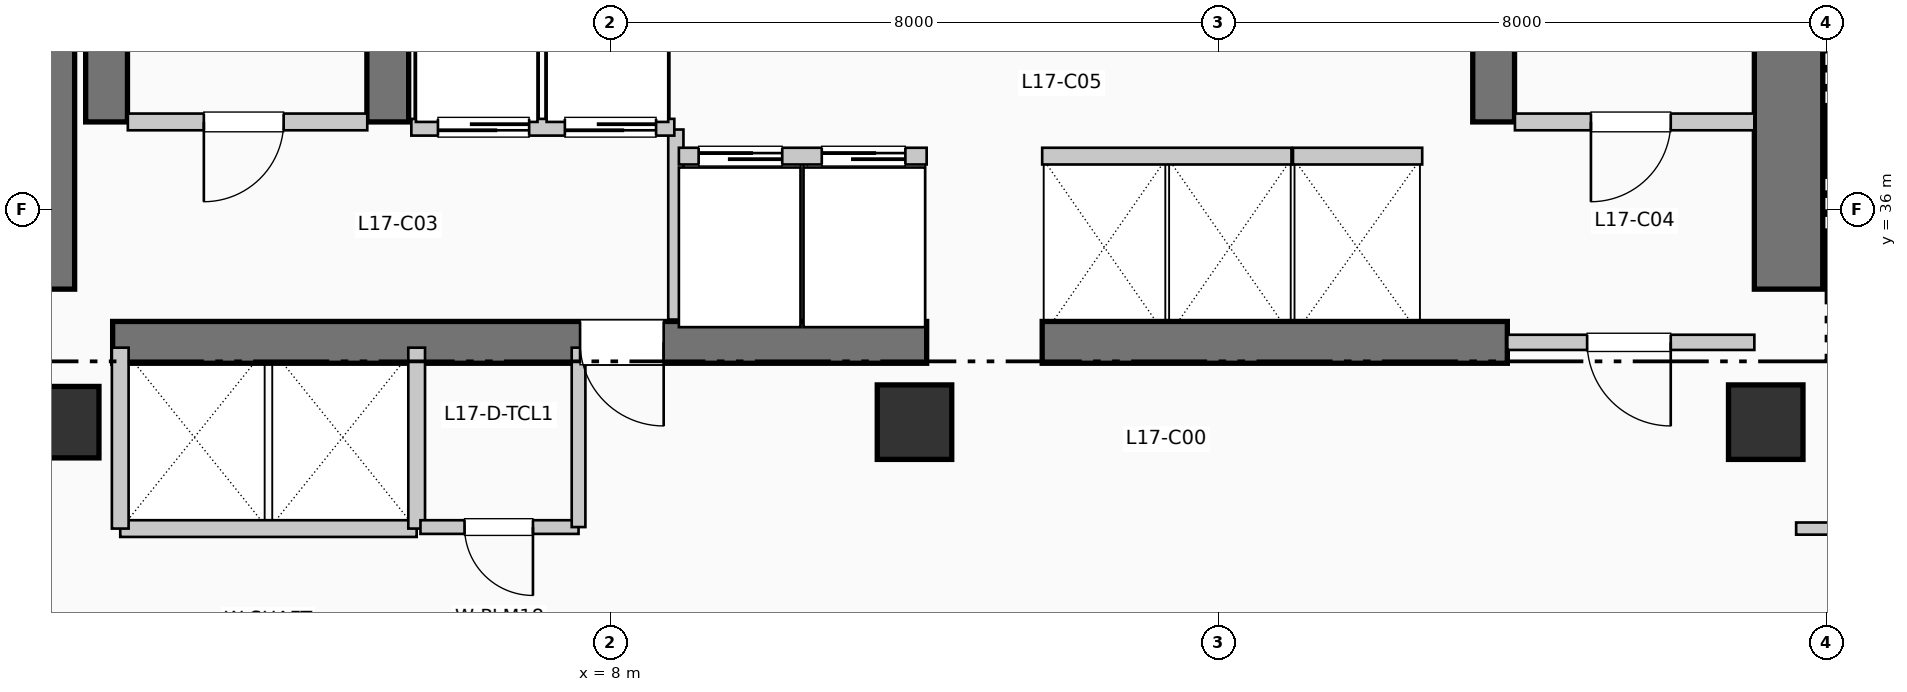
"""IFC4 building model, lengths in metres.
Left out: names, types, materials, properties, quantities, classifications, styles, units other than length and angle.
Written with IfcOpenShell. Run it as: python <this file> out.ifc"""

import sys

from ifc_helpers import new_model, si_unit, direction, frame, frame_2d, origin, origin_2d, place, context, subcontext, project, spatial, rectangle, extrude, element, fill, save


model = new_model("IFC4")
c1 = context("Model", 3, precision=1e-05, world=origin(), true_north=direction((0.0, 1.0)))
c2 = subcontext(c1, "Body", "Model", "MODEL_VIEW")
j1 = project(units=[si_unit("LENGTHUNIT", "METRE"), si_unit("PLANEANGLEUNIT", "RADIAN")], contexts=[c1])
p1 = place(None, origin())
s1 = spatial("IfcSite", under=j1, at=p1, CompositionType="ELEMENT")
p2 = place(p1, origin())
s2 = spatial("IfcBuilding", under=s1, at=p2, CompositionType="ELEMENT")
p3 = place(p2, frame((0.0, 0.0, 73.92)))
s3 = spatial("IfcBuildingStorey", under=s2, at=p3, CompositionType="ELEMENT", Elevation=73.92)
p4 = place(p3, frame((0.5, 34.95, 0.0), z_axis=(0.0, 0.0, 1.0), x_axis=(0.0, 1.0, 0.0)))
e1 = element("IfcWall", 1, at=p4, inside=s3, PredefinedType="SHEAR", context=c2, shape_type="SweptSolid", body=[
    extrude(rectangle(XDim=7.9, YDim=0.9, at=frame_2d((3.95, 0.0))), origin(), (0.0, 0.0, 1.0), 3.96),
])
p5 = place(p3, frame((23.5, 34.95, 0.0), z_axis=(0.0, 0.0, 1.0), x_axis=(0.0, 1.0, 0.0)))
e2 = element("IfcWall", 2, at=p5, inside=s3, PredefinedType="SHEAR", context=c2, shape_type="SweptSolid", body=[
    extrude(rectangle(XDim=10.64, YDim=0.9, at=frame_2d((5.32, 0.0))), origin(), (0.0, 0.0, 1.0), 3.96),
])
p6 = place(p3, frame((1.45, 34.25, 0.0), z_axis=(0.0, 0.0, 1.0), x_axis=(1.0, 0.0, 0.0)))
e3 = element("IfcWall", 3, at=p6, inside=s3, PredefinedType="SHEAR", context=c2, shape_type="SweptSolid", body=[
    extrude(rectangle(XDim=10.71, YDim=0.55, at=frame_2d((5.355, 0.0))), origin(), (0.0, 0.0, 1.0), 3.96),
])
p7 = place(p6, frame((7.25, 0.0, 0.0), z_axis=(0.0, 0.0, 1.0), x_axis=(-1.0, 0.0, 0.0)))
e4 = element("IfcOpeningElement", 4, at=p7, cuts=e3, PredefinedType="OPENING", context=c2, shape_type="SweptSolid", body=[
    extrude(rectangle(XDim=1.1, YDim=2.15, at=frame_2d((0.55, 1.075))), frame((0.0, 0.285, 0.0), z_axis=(0.0, -1.0, 0.0), x_axis=(1.0, 0.0, 0.0)), (0.0, 0.0, 1.0), 0.57),
])
p8 = place(p3, frame((13.68, 34.25, 0.0), z_axis=(0.0, 0.0, 1.0), x_axis=(1.0, 0.0, 0.0)))
e5 = element("IfcWall", 5, at=p8, inside=s3, PredefinedType="SHEAR", context=c2, shape_type="SweptSolid", body=[
    extrude(rectangle(XDim=6.12, YDim=0.55, at=frame_2d((3.06, 0.0))), origin(), (0.0, 0.0, 1.0), 3.96),
])
for number, where, z_axis, x_axis in (
    (6, (1.37, 37.15, 0.0), (0.0, 0.0, 1.0), (0.0, 1.0, 0.0)),
    (7, (5.07, 37.15, 0.0), (0.0, 0.0, 1.0), (0.0, 1.0, 0.0)),
    (8, (19.62, 37.15, 0.0), (0.0, 0.0, 1.0), (0.0, 1.0, 0.0)),
):
    element("IfcWall", number, at=place(p3, frame(where, z_axis=z_axis, x_axis=x_axis)), inside=s3, PredefinedType="SHEAR", context=c2, shape_type="SweptSolid", body=[
        extrude(rectangle(XDim=7.89, YDim=0.55, at=frame_2d((3.945, 0.0))), origin(), (0.0, 0.0, 1.0), 3.96),
    ])
p9 = place(p3, frame((0.8, 33.2, 0.0), z_axis=(0.0, 0.0, 1.0), x_axis=(1.0, 0.0, 0.0)))
e9 = element("IfcColumn", 9, at=p9, inside=s3, PredefinedType="COLUMN", context=c2, shape_type="SweptSolid", body=[
    extrude(rectangle(XDim=0.94, YDim=0.94, at=origin_2d()), origin(), (0.0, 0.0, 1.0), 3.96),
])
for number, where, z_axis, x_axis in (
    (10, (12.0, 33.2, 0.0), (0.0, 0.0, 1.0), (1.0, 0.0, 0.0)),
    (11, (23.2, 33.2, 0.0), (0.0, 0.0, 1.0), (1.0, 0.0, 0.0)),
):
    element("IfcColumn", number, at=place(p3, frame(where, z_axis=z_axis, x_axis=x_axis)), inside=s3, PredefinedType="COLUMN", context=c2, shape_type="SweptSolid", body=[
        extrude(rectangle(XDim=0.98, YDim=0.98, at=origin_2d()), origin(), (0.0, 0.0, 1.0), 3.96),
    ])
p10 = place(p3, frame((1.65, 37.15, 0.0), z_axis=(0.0, 0.0, 1.0), x_axis=(1.0, 0.0, 0.0)))
e12 = element("IfcWall", 12, at=p10, inside=s3, PredefinedType="PARTITIONING", context=c2, shape_type="SweptSolid", body=[
    extrude(rectangle(XDim=3.15, YDim=0.22, at=frame_2d((1.575, 0.0))), origin(), (0.0, 0.0, 1.0), 3.71),
])
p11 = place(p10, frame((2.05, 0.0, 0.0), z_axis=(0.0, 0.0, 1.0), x_axis=(-1.0, 0.0, 0.0)))
e13 = element("IfcOpeningElement", 13, at=p11, cuts=e12, PredefinedType="OPENING", context=c2, shape_type="SweptSolid", body=[
    extrude(rectangle(XDim=1.05, YDim=2.15, at=frame_2d((0.525, 1.075))), frame((0.0, 0.12, 0.0), z_axis=(0.0, -1.0, 0.0), x_axis=(1.0, 0.0, 0.0)), (0.0, 0.0, 1.0), 0.24),
])
p12 = place(p3, frame((8.86, 34.55, 0.0), z_axis=(0.0, 0.0, 1.0), x_axis=(0.0, 1.0, 0.0)))
e14 = element("IfcWall", 14, at=p12, inside=s3, PredefinedType="PARTITIONING", context=c2, shape_type="SweptSolid", body=[
    extrude(rectangle(XDim=2.5, YDim=0.2, at=frame_2d((1.25, 0.0))), origin(), (0.0, 0.0, 1.0), 3.71),
])
p13 = place(p3, frame((19.9, 37.15, 0.0), z_axis=(0.0, 0.0, 1.0), x_axis=(1.0, 0.0, 0.0)))
e15 = element("IfcWall", 15, at=p13, inside=s3, PredefinedType="PARTITIONING", context=c2, shape_type="SweptSolid", body=[
    extrude(rectangle(XDim=3.15, YDim=0.22, at=frame_2d((1.575, 0.0))), origin(), (0.0, 0.0, 1.0), 3.71),
])
p14 = place(p13, frame((2.05, 0.0, 0.0), z_axis=(0.0, 0.0, 1.0), x_axis=(-1.0, 0.0, 0.0)))
e16 = element("IfcOpeningElement", 16, at=p14, cuts=e15, PredefinedType="OPENING", context=c2, shape_type="SweptSolid", body=[
    extrude(rectangle(XDim=1.05, YDim=2.15, at=frame_2d((0.525, 1.075))), frame((0.0, 0.12, 0.0), z_axis=(0.0, -1.0, 0.0), x_axis=(1.0, 0.0, 0.0)), (0.0, 0.0, 1.0), 0.24),
])
p15 = place(p3, frame((19.8, 34.25, 0.0), z_axis=(0.0, 0.0, 1.0), x_axis=(1.0, 0.0, 0.0)))
e17 = element("IfcWall", 17, at=p15, inside=s3, PredefinedType="PARTITIONING", context=c2, shape_type="SweptSolid", body=[
    extrude(rectangle(XDim=3.25, YDim=0.2, at=frame_2d((1.625, 0.0))), origin(), (0.0, 0.0, 1.0), 3.71),
])
p16 = place(p15, frame((2.15, 0.0, 0.0), z_axis=(0.0, 0.0, 1.0), x_axis=(-1.0, 0.0, 0.0)))
e18 = element("IfcOpeningElement", 18, at=p16, cuts=e17, PredefinedType="OPENING", context=c2, shape_type="SweptSolid", body=[
    extrude(rectangle(XDim=1.1, YDim=2.15, at=frame_2d((0.55, 1.075))), frame((0.0, 0.11, 0.0), z_axis=(0.0, -1.0, 0.0), x_axis=(1.0, 0.0, 0.0)), (0.0, 0.0, 1.0), 0.22),
])
p17 = place(p3, frame((5.38, 37.08, 0.0), z_axis=(0.0, 0.0, 1.0), x_axis=(1.0, 0.0, 0.0)))
e19 = element("IfcWall", 19, at=p17, inside=s3, PredefinedType="PARTITIONING", context=c2, shape_type="SweptSolid", body=[
    extrude(rectangle(XDim=3.46, YDim=0.22, at=frame_2d((1.73, 0.0))), origin(), (0.0, 0.0, 1.0), 3.71),
])
p18 = place(p17, frame((1.55, 0.0, 0.0), z_axis=(0.0, 0.0, 1.0), x_axis=(-1.0, 0.0, 0.0)))
e20 = element("IfcOpeningElement", 20, at=p18, cuts=e19, PredefinedType="OPENING", context=c2, shape_type="SweptSolid", body=[
    extrude(rectangle(XDim=1.2, YDim=2.2, at=frame_2d((0.6, 1.1))), frame((0.0, 0.12, 0.0), z_axis=(0.0, -1.0, 0.0), x_axis=(1.0, 0.0, 0.0)), (0.0, 0.0, 1.0), 0.24),
])
p19 = place(p17, frame((3.22, 0.0, 0.0), z_axis=(0.0, 0.0, 1.0), x_axis=(-1.0, 0.0, 0.0)))
e21 = element("IfcOpeningElement", 21, at=p19, cuts=e19, PredefinedType="OPENING", context=c2, shape_type="SweptSolid", body=[
    extrude(rectangle(XDim=1.2, YDim=2.2, at=frame_2d((0.6, 1.1))), frame((0.0, 0.12, 0.0), z_axis=(0.0, -1.0, 0.0), x_axis=(1.0, 0.0, 0.0)), (0.0, 0.0, 1.0), 0.24),
])
p20 = place(p3, frame((1.55, 31.8, 0.0), z_axis=(0.0, 0.0, 1.0), x_axis=(1.0, 0.0, 0.0)))
e22 = element("IfcWall", 22, at=p20, inside=s3, PredefinedType="PARTITIONING", context=c2, shape_type="SweptSolid", body=[
    extrude(rectangle(XDim=3.9, YDim=0.22, at=frame_2d((1.95, 0.0))), origin(), (0.0, 0.0, 1.0), 3.71),
])
for number, where, z_axis, x_axis in (
    (23, (1.55, 31.8, 0.0), (0.0, 0.0, 1.0), (0.0, 1.0, 0.0)),
    (24, (5.45, 31.8, 0.0), (0.0, 0.0, 1.0), (0.0, 1.0, 0.0)),
):
    element("IfcWall", number, at=place(p3, frame(where, z_axis=z_axis, x_axis=x_axis)), inside=s3, PredefinedType="PARTITIONING", context=c2, shape_type="SweptSolid", body=[
        extrude(rectangle(XDim=2.38, YDim=0.22, at=frame_2d((1.19, 0.0))), origin(), (0.0, 0.0, 1.0), 3.71),
    ])
p21 = place(p3, frame((5.5, 31.82, 0.0), z_axis=(0.0, 0.0, 1.0), x_axis=(1.0, 0.0, 0.0)))
e25 = element("IfcWall", 25, at=p21, inside=s3, PredefinedType="PLUMBINGWALL", context=c2, shape_type="SweptSolid", body=[
    extrude(rectangle(XDim=2.08, YDim=0.18, at=frame_2d((1.04, 0.0))), origin(), (0.0, 0.0, 1.0), 3.71),
])
p22 = place(p21, frame((1.48, 0.0, 0.0), z_axis=(0.0, 0.0, 1.0), x_axis=(-1.0, 0.0, 0.0)))
e26 = element("IfcOpeningElement", 26, at=p22, cuts=e25, PredefinedType="OPENING", context=c2, shape_type="SweptSolid", body=[
    extrude(rectangle(XDim=0.9, YDim=2.1, at=frame_2d((0.45, 1.05))), frame((0.0, 0.1, 0.0), z_axis=(0.0, -1.0, 0.0), x_axis=(1.0, 0.0, 0.0)), (0.0, 0.0, 1.0), 0.2),
])
p23 = place(p3, frame((7.58, 31.82, 0.0), z_axis=(0.0, 0.0, 1.0), x_axis=(0.0, 1.0, 0.0)))
e27 = element("IfcWall", 27, at=p23, inside=s3, PredefinedType="PLUMBINGWALL", context=c2, shape_type="SweptSolid", body=[
    extrude(rectangle(XDim=2.36, YDim=0.18, at=frame_2d((1.18, 0.0))), origin(), (0.0, 0.0, 1.0), 3.71),
])
p24 = place(p3, frame((8.9, 36.7, 0.0), z_axis=(0.0, 0.0, 1.0), x_axis=(1.0, 0.0, 0.0)))
e28 = element("IfcWall", 28, at=p24, inside=s3, PredefinedType="PARTITIONING", context=c2, shape_type="SweptSolid", body=[
    extrude(rectangle(XDim=3.26, YDim=0.22, at=frame_2d((1.63, 0.0))), origin(), (0.0, 0.0, 1.0), 3.71),
])
p25 = place(p24, frame((0.26, 0.0, 0.0)))
e29 = element("IfcOpeningElement", 29, at=p25, cuts=e28, PredefinedType="OPENING", context=c2, shape_type="SweptSolid", body=[
    extrude(rectangle(XDim=1.1, YDim=2.2, at=frame_2d((0.55, 1.1))), frame((0.0, 0.12, 0.0), z_axis=(0.0, -1.0, 0.0), x_axis=(1.0, 0.0, 0.0)), (0.0, 0.0, 1.0), 0.24),
])
p26 = place(p24, frame((1.88, 0.0, 0.0)))
e30 = element("IfcOpeningElement", 30, at=p26, cuts=e28, PredefinedType="OPENING", context=c2, shape_type="SweptSolid", body=[
    extrude(rectangle(XDim=1.1, YDim=2.2, at=frame_2d((0.55, 1.1))), frame((0.0, 0.12, 0.0), z_axis=(0.0, -1.0, 0.0), x_axis=(1.0, 0.0, 0.0)), (0.0, 0.0, 1.0), 0.24),
])
p27 = place(p3, frame((13.68, 36.7, 0.0), z_axis=(0.0, 0.0, 1.0), x_axis=(1.0, 0.0, 0.0)))
e31 = element("IfcWall", 31, at=p27, inside=s3, PredefinedType="PARTITIONING", context=c2, shape_type="SweptSolid", body=[
    extrude(rectangle(XDim=3.28, YDim=0.22, at=frame_2d((1.64, 0.0))), origin(), (0.0, 0.0, 1.0), 3.71),
])
p28 = place(p3, frame((16.98, 36.7, 0.0), z_axis=(0.0, 0.0, 1.0), x_axis=(1.0, 0.0, 0.0)))
e32 = element("IfcWall", 32, at=p28, inside=s3, PredefinedType="PARTITIONING", context=c2, shape_type="SweptSolid", body=[
    extrude(rectangle(XDim=1.7, YDim=0.22, at=frame_2d((0.85, 0.0))), origin(), (0.0, 0.0, 1.0), 3.71),
])
p29 = place(p3, frame((23.6, 31.8, 0.0), z_axis=(0.0, 0.0, 1.0), x_axis=(1.0, 0.0, 0.0)))
e33 = element("IfcWall", 33, at=p29, inside=s3, PredefinedType="PARTITIONING", context=c2, shape_type="SweptSolid", body=[
    extrude(rectangle(XDim=32.21, YDim=0.16, at=frame_2d((16.105, 0.0))), origin(), (0.0, 0.0, 1.0), 3.71),
])
p30 = place(p29, frame((2.585, 0.0, 0.0)))
e34 = element("IfcOpeningElement", 34, at=p30, cuts=e33, PredefinedType="OPENING", context=c2, shape_type="SweptSolid", body=[
    extrude(rectangle(XDim=0.95, YDim=2.15, at=frame_2d((0.475, 1.075))), frame((0.0, 0.09, 0.0), z_axis=(0.0, -1.0, 0.0), x_axis=(1.0, 0.0, 0.0)), (0.0, 0.0, 1.0), 0.18),
])
p31 = place(p29, frame((8.866, 0.0, 0.0)))
e35 = element("IfcOpeningElement", 35, at=p31, cuts=e33, PredefinedType="OPENING", context=c2, shape_type="SweptSolid", body=[
    extrude(rectangle(XDim=0.95, YDim=2.15, at=frame_2d((0.475, 1.075))), frame((0.0, 0.09, 0.0), z_axis=(0.0, -1.0, 0.0), x_axis=(1.0, 0.0, 0.0)), (0.0, 0.0, 1.0), 0.18),
])
p32 = place(p29, frame((14.469, 0.0, 0.0)))
e36 = element("IfcOpeningElement", 36, at=p32, cuts=e33, PredefinedType="OPENING", context=c2, shape_type="SweptSolid", body=[
    extrude(rectangle(XDim=0.95, YDim=2.15, at=frame_2d((0.475, 1.075))), frame((0.0, 0.09, 0.0), z_axis=(0.0, -1.0, 0.0), x_axis=(1.0, 0.0, 0.0)), (0.0, 0.0, 1.0), 0.18),
])
p33 = place(p29, frame((22.072, 0.0, 0.0)))
e37 = element("IfcOpeningElement", 37, at=p33, cuts=e33, PredefinedType="OPENING", context=c2, shape_type="SweptSolid", body=[
    extrude(rectangle(XDim=0.95, YDim=2.15, at=frame_2d((0.475, 1.075))), frame((0.0, 0.09, 0.0), z_axis=(0.0, -1.0, 0.0), x_axis=(1.0, 0.0, 0.0)), (0.0, 0.0, 1.0), 0.18),
])
p34 = place(p29, frame((28.514, 0.0, 0.0)))
e38 = element("IfcOpeningElement", 38, at=p34, cuts=e33, PredefinedType="OPENING", context=c2, shape_type="SweptSolid", body=[
    extrude(rectangle(XDim=0.95, YDim=2.15, at=frame_2d((0.475, 1.075))), frame((0.0, 0.09, 0.0), z_axis=(0.0, -1.0, 0.0), x_axis=(1.0, 0.0, 0.0)), (0.0, 0.0, 1.0), 0.18),
])
p35 = place(p11, origin())
e39 = element("IfcDoor", 39, at=p35, inside=s3, OperationType="SINGLE_SWING_LEFT", PredefinedType="DOOR", context=c2, shape_type="SweptSolid", body=[
    extrude(rectangle(XDim=1.05, YDim=2.15, at=frame_2d((0.525, 1.075))), frame((0.0, 0.025, 0.0), z_axis=(0.0, -1.0, 0.0), x_axis=(1.0, 0.0, 0.0)), (0.0, 0.0, 1.0), 0.05),
])
fill(e13, e39)
p36 = place(p7, origin())
e40 = element("IfcDoor", 40, at=p36, inside=s3, OperationType="SINGLE_SWING_RIGHT", PredefinedType="DOOR", context=c2, shape_type="SweptSolid", body=[
    extrude(rectangle(XDim=1.1, YDim=2.15, at=frame_2d((0.55, 1.075))), frame((0.0, 0.025, 0.0), z_axis=(0.0, -1.0, 0.0), x_axis=(1.0, 0.0, 0.0)), (0.0, 0.0, 1.0), 0.05),
])
fill(e4, e40)
p37 = place(p14, origin())
e41 = element("IfcDoor", 41, at=p37, inside=s3, OperationType="SINGLE_SWING_LEFT", PredefinedType="DOOR", context=c2, shape_type="SweptSolid", body=[
    extrude(rectangle(XDim=1.05, YDim=2.15, at=frame_2d((0.525, 1.075))), frame((0.0, 0.025, 0.0), z_axis=(0.0, -1.0, 0.0), x_axis=(1.0, 0.0, 0.0)), (0.0, 0.0, 1.0), 0.05),
])
fill(e16, e41)
p38 = place(p16, origin())
e42 = element("IfcDoor", 42, at=p38, inside=s3, OperationType="SINGLE_SWING_RIGHT", PredefinedType="DOOR", context=c2, shape_type="SweptSolid", body=[
    extrude(rectangle(XDim=1.1, YDim=2.15, at=frame_2d((0.55, 1.075))), frame((0.0, 0.025, 0.0), z_axis=(0.0, -1.0, 0.0), x_axis=(1.0, 0.0, 0.0)), (0.0, 0.0, 1.0), 0.05),
])
fill(e18, e42)
p39 = place(p18, origin())
e43 = element("IfcDoor", 43, at=p39, inside=s3, OperationType="SLIDING_TO_RIGHT", PredefinedType="DOOR", context=c2, shape_type="SweptSolid", body=[
    extrude(rectangle(XDim=1.2, YDim=2.2, at=frame_2d((0.6, 1.1))), frame((0.0, 0.025, 0.0), z_axis=(0.0, -1.0, 0.0), x_axis=(1.0, 0.0, 0.0)), (0.0, 0.0, 1.0), 0.05),
])
fill(e20, e43)
p40 = place(p19, origin())
e44 = element("IfcDoor", 44, at=p40, inside=s3, OperationType="SLIDING_TO_RIGHT", PredefinedType="DOOR", context=c2, shape_type="SweptSolid", body=[
    extrude(rectangle(XDim=1.2, YDim=2.2, at=frame_2d((0.6, 1.1))), frame((0.0, 0.025, 0.0), z_axis=(0.0, -1.0, 0.0), x_axis=(1.0, 0.0, 0.0)), (0.0, 0.0, 1.0), 0.05),
])
fill(e21, e44)
p41 = place(p22, origin())
e45 = element("IfcDoor", 45, at=p41, inside=s3, OperationType="SINGLE_SWING_RIGHT", PredefinedType="DOOR", context=c2, shape_type="SweptSolid", body=[
    extrude(rectangle(XDim=0.9, YDim=2.1, at=frame_2d((0.45, 1.05))), frame((0.0, 0.025, 0.0), z_axis=(0.0, -1.0, 0.0), x_axis=(1.0, 0.0, 0.0)), (0.0, 0.0, 1.0), 0.05),
])
fill(e26, e45)
p42 = place(p25, origin())
e46 = element("IfcDoor", 46, at=p42, inside=s3, OperationType="SLIDING_TO_LEFT", PredefinedType="DOOR", context=c2, shape_type="SweptSolid", body=[
    extrude(rectangle(XDim=1.1, YDim=2.2, at=frame_2d((0.55, 1.1))), frame((0.0, 0.025, 0.0), z_axis=(0.0, -1.0, 0.0), x_axis=(1.0, 0.0, 0.0)), (0.0, 0.0, 1.0), 0.05),
])
fill(e29, e46)
p43 = place(p26, origin())
e47 = element("IfcDoor", 47, at=p43, inside=s3, OperationType="SLIDING_TO_LEFT", PredefinedType="DOOR", context=c2, shape_type="SweptSolid", body=[
    extrude(rectangle(XDim=1.1, YDim=2.2, at=frame_2d((0.55, 1.1))), frame((0.0, 0.025, 0.0), z_axis=(0.0, -1.0, 0.0), x_axis=(1.0, 0.0, 0.0)), (0.0, 0.0, 1.0), 0.05),
])
fill(e30, e47)
save(model, sys.argv[1])
